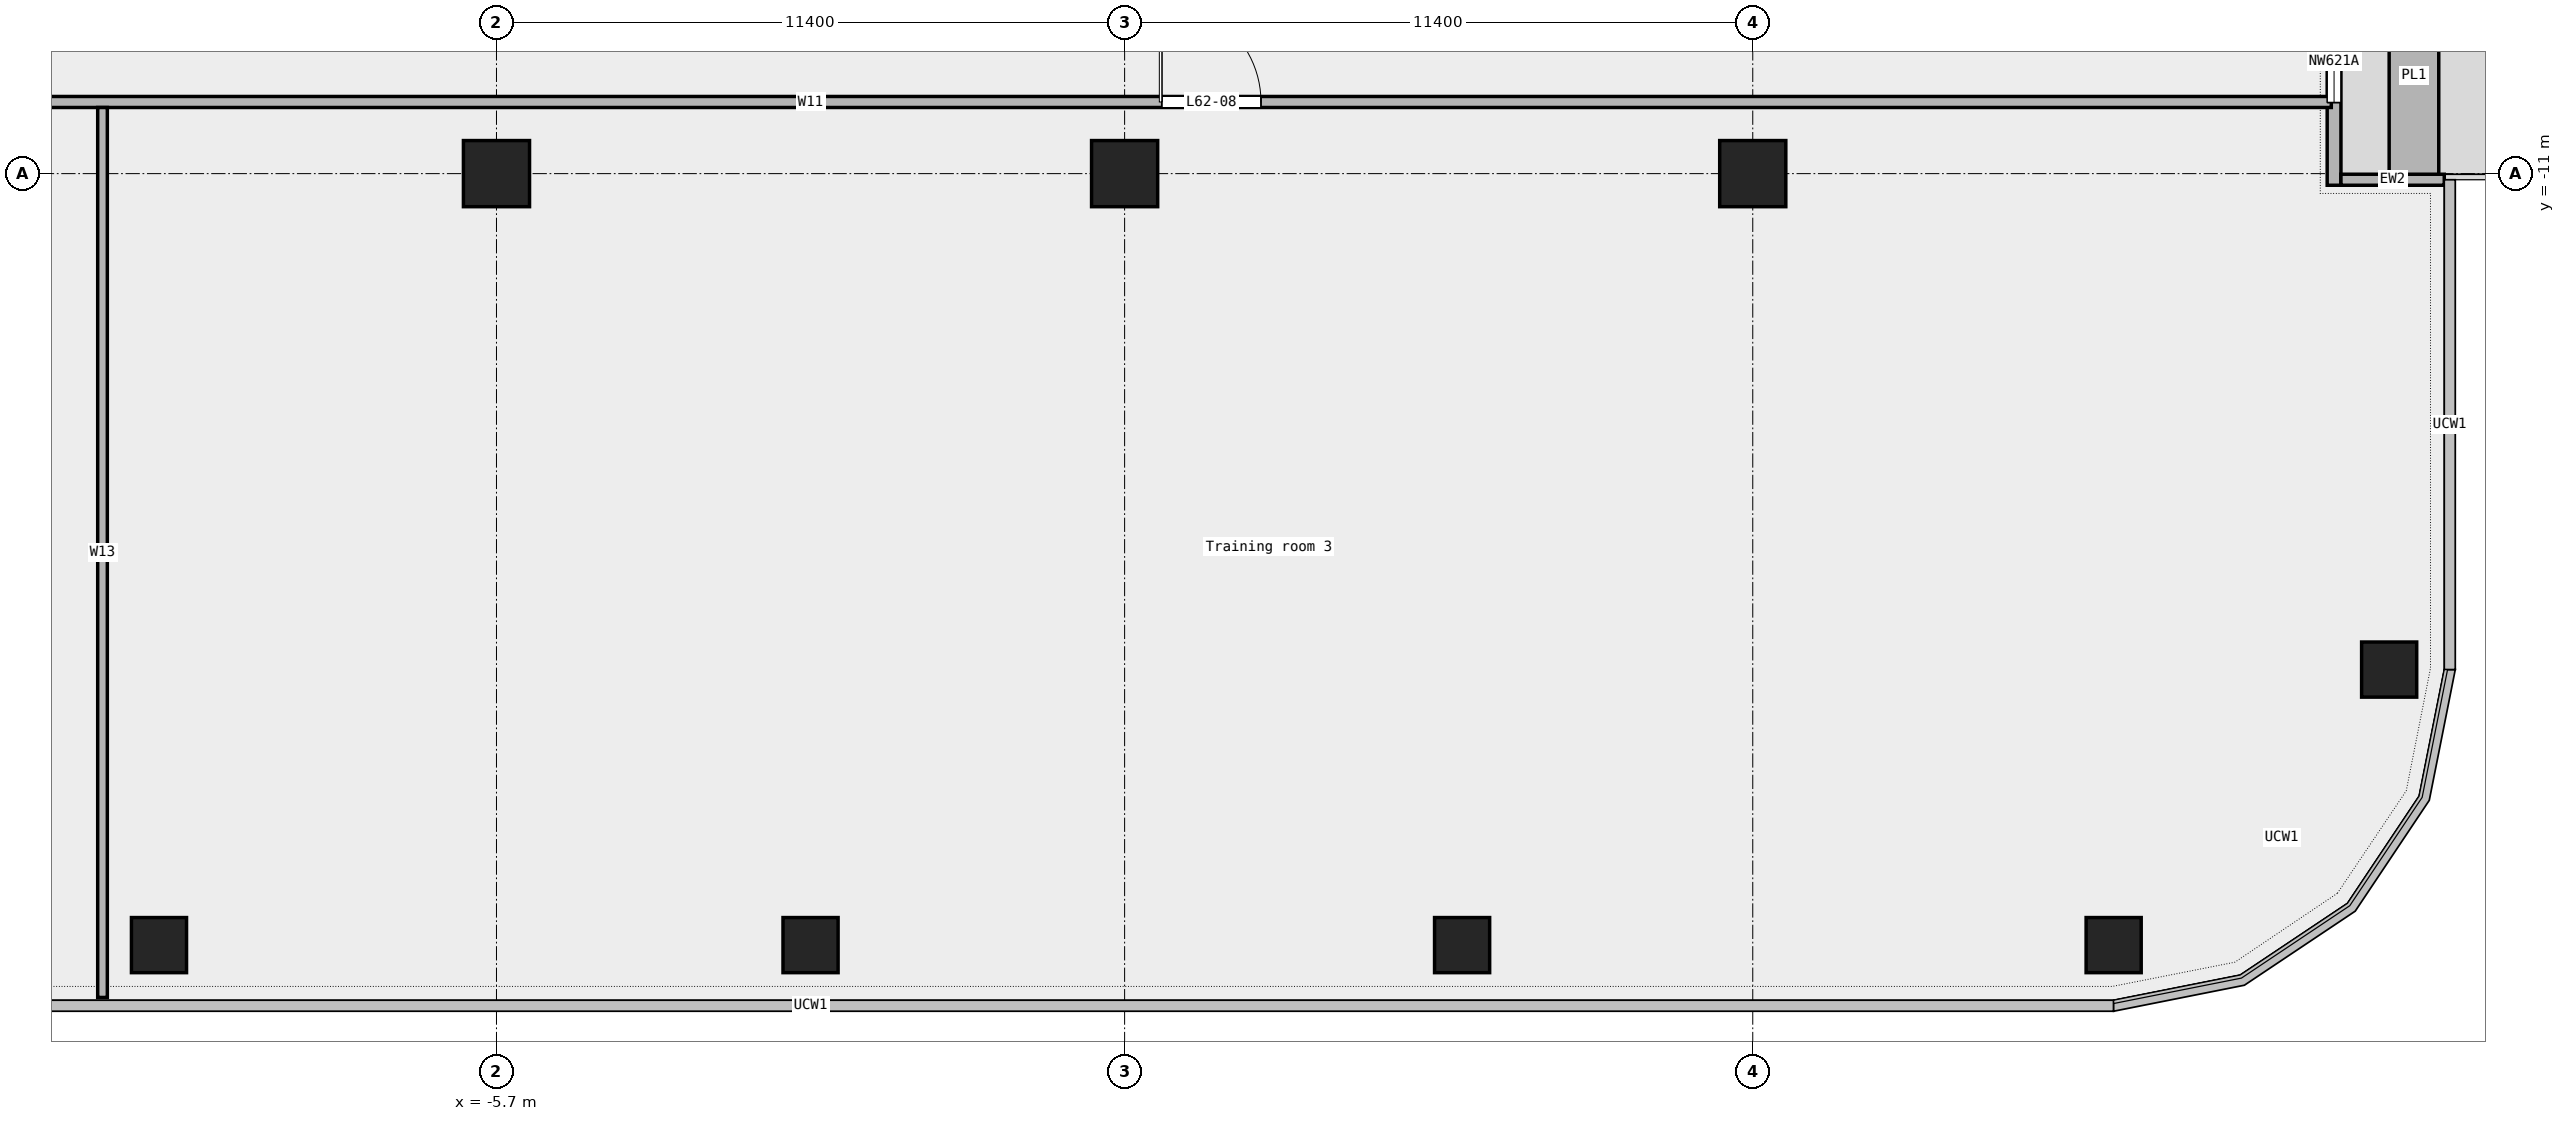
"""IFC4 building model, lengths in metres.
Left out: names, types, materials, properties, quantities, classifications, styles, units other than length and angle.
Written with IfcOpenShell. Run it as: python <this file> out.ifc"""

import sys

from ifc_helpers import new_model, si_unit, direction, frame, frame_2d, origin, origin_2d, place, context, subcontext, project, spatial, rectangle, extrude, element, fill, save


model = new_model("IFC4")
c1 = context("Model", 3, precision=1e-05, world=origin(), true_north=direction((0.0, 1.0)))
c2 = subcontext(c1, "Body", "Model", "MODEL_VIEW")
j1 = project(units=[si_unit("LENGTHUNIT", "METRE"), si_unit("PLANEANGLEUNIT", "RADIAN")], contexts=[c1])
p1 = place(None, origin())
s1 = spatial("IfcSite", under=j1, at=p1, CompositionType="ELEMENT")
p2 = place(p1, origin())
s2 = spatial("IfcBuilding", under=s1, at=p2, CompositionType="ELEMENT")
p3 = place(p2, frame((0.0, 0.0, 287.4)))
s3 = spatial("IfcBuildingStorey", under=s2, at=p3, CompositionType="ELEMENT", Elevation=287.4)
for number, where, z_axis, x_axis in (
    (1, (-11.825, -25.0, 0.0), (0.0, 0.0, 1.0), (1.0, 0.0, 0.0)),
    (2, (0.0, -25.0, 0.0), (0.0, 0.0, 1.0), (1.0, 0.0, 0.0)),
    (3, (11.825, -25.0, 0.0), (0.0, 0.0, 1.0), (1.0, 0.0, 0.0)),
    (4, (23.65, -25.0, 0.0), (0.0, 0.0, 1.0), (1.0, 0.0, 0.0)),
    (5, (28.65, -20.0, 0.0), (0.0, 0.0, 1.0), (1.0, 0.0, 0.0)),
):
    element("IfcColumn", number, at=place(p3, frame(where, z_axis=z_axis, x_axis=x_axis)), inside=s3, PredefinedType="COLUMN", context=c2, shape_type="SweptSolid", body=[
        extrude(rectangle(XDim=1.0, YDim=1.0, at=origin_2d()), origin(), (0.0, 0.0, 1.0), 3.6),
    ])
for number, where, z_axis, x_axis in (
    (6, (-5.7, -11.0, 0.0), (0.0, 0.0, 1.0), (1.0, 0.0, 0.0)),
    (7, (5.7, -11.0, 0.0), (0.0, 0.0, 1.0), (1.0, 0.0, 0.0)),
    (8, (17.1, -11.0, 0.0), (0.0, 0.0, 1.0), (1.0, 0.0, 0.0)),
):
    element("IfcColumn", number, at=place(p3, frame(where, z_axis=z_axis, x_axis=x_axis)), inside=s3, PredefinedType="COLUMN", context=c2, shape_type="SweptSolid", body=[
        extrude(rectangle(XDim=1.2, YDim=1.2, at=origin_2d()), origin(), (0.0, 0.0, 1.0), 3.6),
    ])
p4 = place(p3, frame((27.65, -11.211, 0.0), z_axis=(0.0, 0.0, 1.0), x_axis=(0.0, 1.0, 0.0)))
e9 = element("IfcWall", 9, at=p4, inside=s3, PredefinedType="STANDARD", context=c2, shape_type="SweptSolid", body=[
    extrude(rectangle(XDim=13.533, YDim=0.25, at=frame_2d((6.767, 0.0))), origin(), (0.0, 0.0, 1.0), 3.6),
])
p5 = place(p4, frame((1.5, 0.0, 0.45)))
e10 = element("IfcOpeningElement", 10, at=p5, cuts=e9, PredefinedType="OPENING", context=c2, shape_type="SweptSolid", body=[
    extrude(rectangle(XDim=1.5, YDim=2.4, at=frame_2d((0.75, 1.2))), frame((0.0, 0.137, 0.0), z_axis=(0.0, -1.0, 0.0), x_axis=(1.0, 0.0, 0.0)), (0.0, 0.0, 1.0), 0.274),
])
p6 = place(p4, frame((5.75, 0.0, 0.0)))
e11 = element("IfcOpeningElement", 11, at=p6, cuts=e9, PredefinedType="OPENING", context=c2, shape_type="SweptSolid", body=[
    extrude(rectangle(XDim=1.8, YDim=2.4, at=frame_2d((0.9, 1.2))), frame((0.0, 0.137, 0.0), z_axis=(0.0, -1.0, 0.0), x_axis=(1.0, 0.0, 0.0)), (0.0, 0.0, 1.0), 0.274),
])
p7 = place(p4, frame((10.5, 0.0, 0.45)))
e12 = element("IfcOpeningElement", 12, at=p7, cuts=e9, PredefinedType="OPENING", context=c2, shape_type="SweptSolid", body=[
    extrude(rectangle(XDim=1.5, YDim=2.4, at=frame_2d((0.75, 1.2))), frame((0.0, 0.137, 0.0), z_axis=(0.0, -1.0, 0.0), x_axis=(1.0, 0.0, 0.0)), (0.0, 0.0, 1.0), 0.274),
])
p8 = place(p3, frame((29.65, -11.111, 0.0), z_axis=(0.0, 0.0, 1.0), x_axis=(-1.0, 0.0, 0.0)))
e13 = element("IfcWall", 13, at=p8, inside=s3, PredefinedType="STANDARD", context=c2, shape_type="SweptSolid", body=[
    extrude(rectangle(XDim=1.875, YDim=0.2, at=frame_2d((0.938, 0.0))), origin(), (0.0, 0.0, 1.0), 3.6),
])
p9 = place(p3, frame((29.1, -11.011, 0.0), z_axis=(0.0, 0.0, 1.0), x_axis=(0.0, 1.0, 0.0)))
e14 = element("IfcWall", 14, at=p9, inside=s3, PredefinedType="STANDARD", context=c2, shape_type="SweptSolid", body=[
    extrude(rectangle(XDim=3.6, YDim=0.9, at=frame_2d((1.8, 0.0))), origin(), (0.0, 0.0, 1.0), 0.7),
])
p10 = place(p3, frame((-27.6, -9.7, 0.0), z_axis=(0.0, 0.0, 1.0), x_axis=(1.0, 0.0, 0.0)))
e15 = element("IfcWall", 15, at=p10, inside=s3, PredefinedType="PARTITIONING", context=c2, shape_type="SweptSolid", body=[
    extrude(rectangle(XDim=55.2, YDim=0.2, at=frame_2d((27.6, 0.0))), origin(), (0.0, 0.0, 1.0), 3.6),
])
p11 = place(p10, frame((6.575, 0.0, 0.0)))
e16 = element("IfcOpeningElement", 16, at=p11, cuts=e15, PredefinedType="OPENING", context=c2, shape_type="SweptSolid", body=[
    extrude(rectangle(XDim=1.8, YDim=2.1, at=frame_2d((0.9, 1.05))), frame((0.0, 0.112, 0.0), z_axis=(0.0, -1.0, 0.0), x_axis=(1.0, 0.0, 0.0)), (0.0, 0.0, 1.0), 0.224),
])
p12 = place(p10, frame((33.975, 0.0, 0.0)))
e17 = element("IfcOpeningElement", 17, at=p12, cuts=e15, PredefinedType="OPENING", context=c2, shape_type="SweptSolid", body=[
    extrude(rectangle(XDim=1.8, YDim=2.1, at=frame_2d((0.9, 1.05))), frame((0.0, 0.112, 0.0), z_axis=(0.0, -1.0, 0.0), x_axis=(1.0, 0.0, 0.0)), (0.0, 0.0, 1.0), 0.224),
])
p13 = place(p3, frame((-12.85, -25.95, 0.0), z_axis=(0.0, 0.0, 1.0), x_axis=(0.0, 1.0, 0.0)))
e18 = element("IfcWall", 18, at=p13, inside=s3, PredefinedType="PARTITIONING", context=c2, shape_type="SweptSolid", body=[
    extrude(rectangle(XDim=16.15, YDim=0.175, at=frame_2d((8.075, 0.0))), origin(), (0.0, 0.0, 1.0), 3.6),
])
p14 = place(p5, origin())
e19 = element("IfcWindow", 19, at=p14, inside=s3, PartitioningType="SINGLE_PANEL", PredefinedType="WINDOW", context=c2, shape_type="SweptSolid", body=[
    extrude(rectangle(XDim=1.5, YDim=2.4, at=frame_2d((0.75, 1.2))), frame((0.0, 0.03, 0.0), z_axis=(0.0, -1.0, 0.0), x_axis=(1.0, 0.0, 0.0)), (0.0, 0.0, 1.0), 0.06),
])
fill(e10, e19)
p15 = place(p12, origin())
e20 = element("IfcDoor", 20, at=p15, inside=s3, OperationType="DOUBLE_DOOR_SINGLE_SWING", PredefinedType="DOOR", context=c2, shape_type="SweptSolid", body=[
    extrude(rectangle(XDim=1.8, YDim=2.1, at=frame_2d((0.9, 1.05))), frame((0.0, 0.025, 0.0), z_axis=(0.0, -1.0, 0.0), x_axis=(1.0, 0.0, 0.0)), (0.0, 0.0, 1.0), 0.05),
])
fill(e17, e20)
save(model, sys.argv[1])
